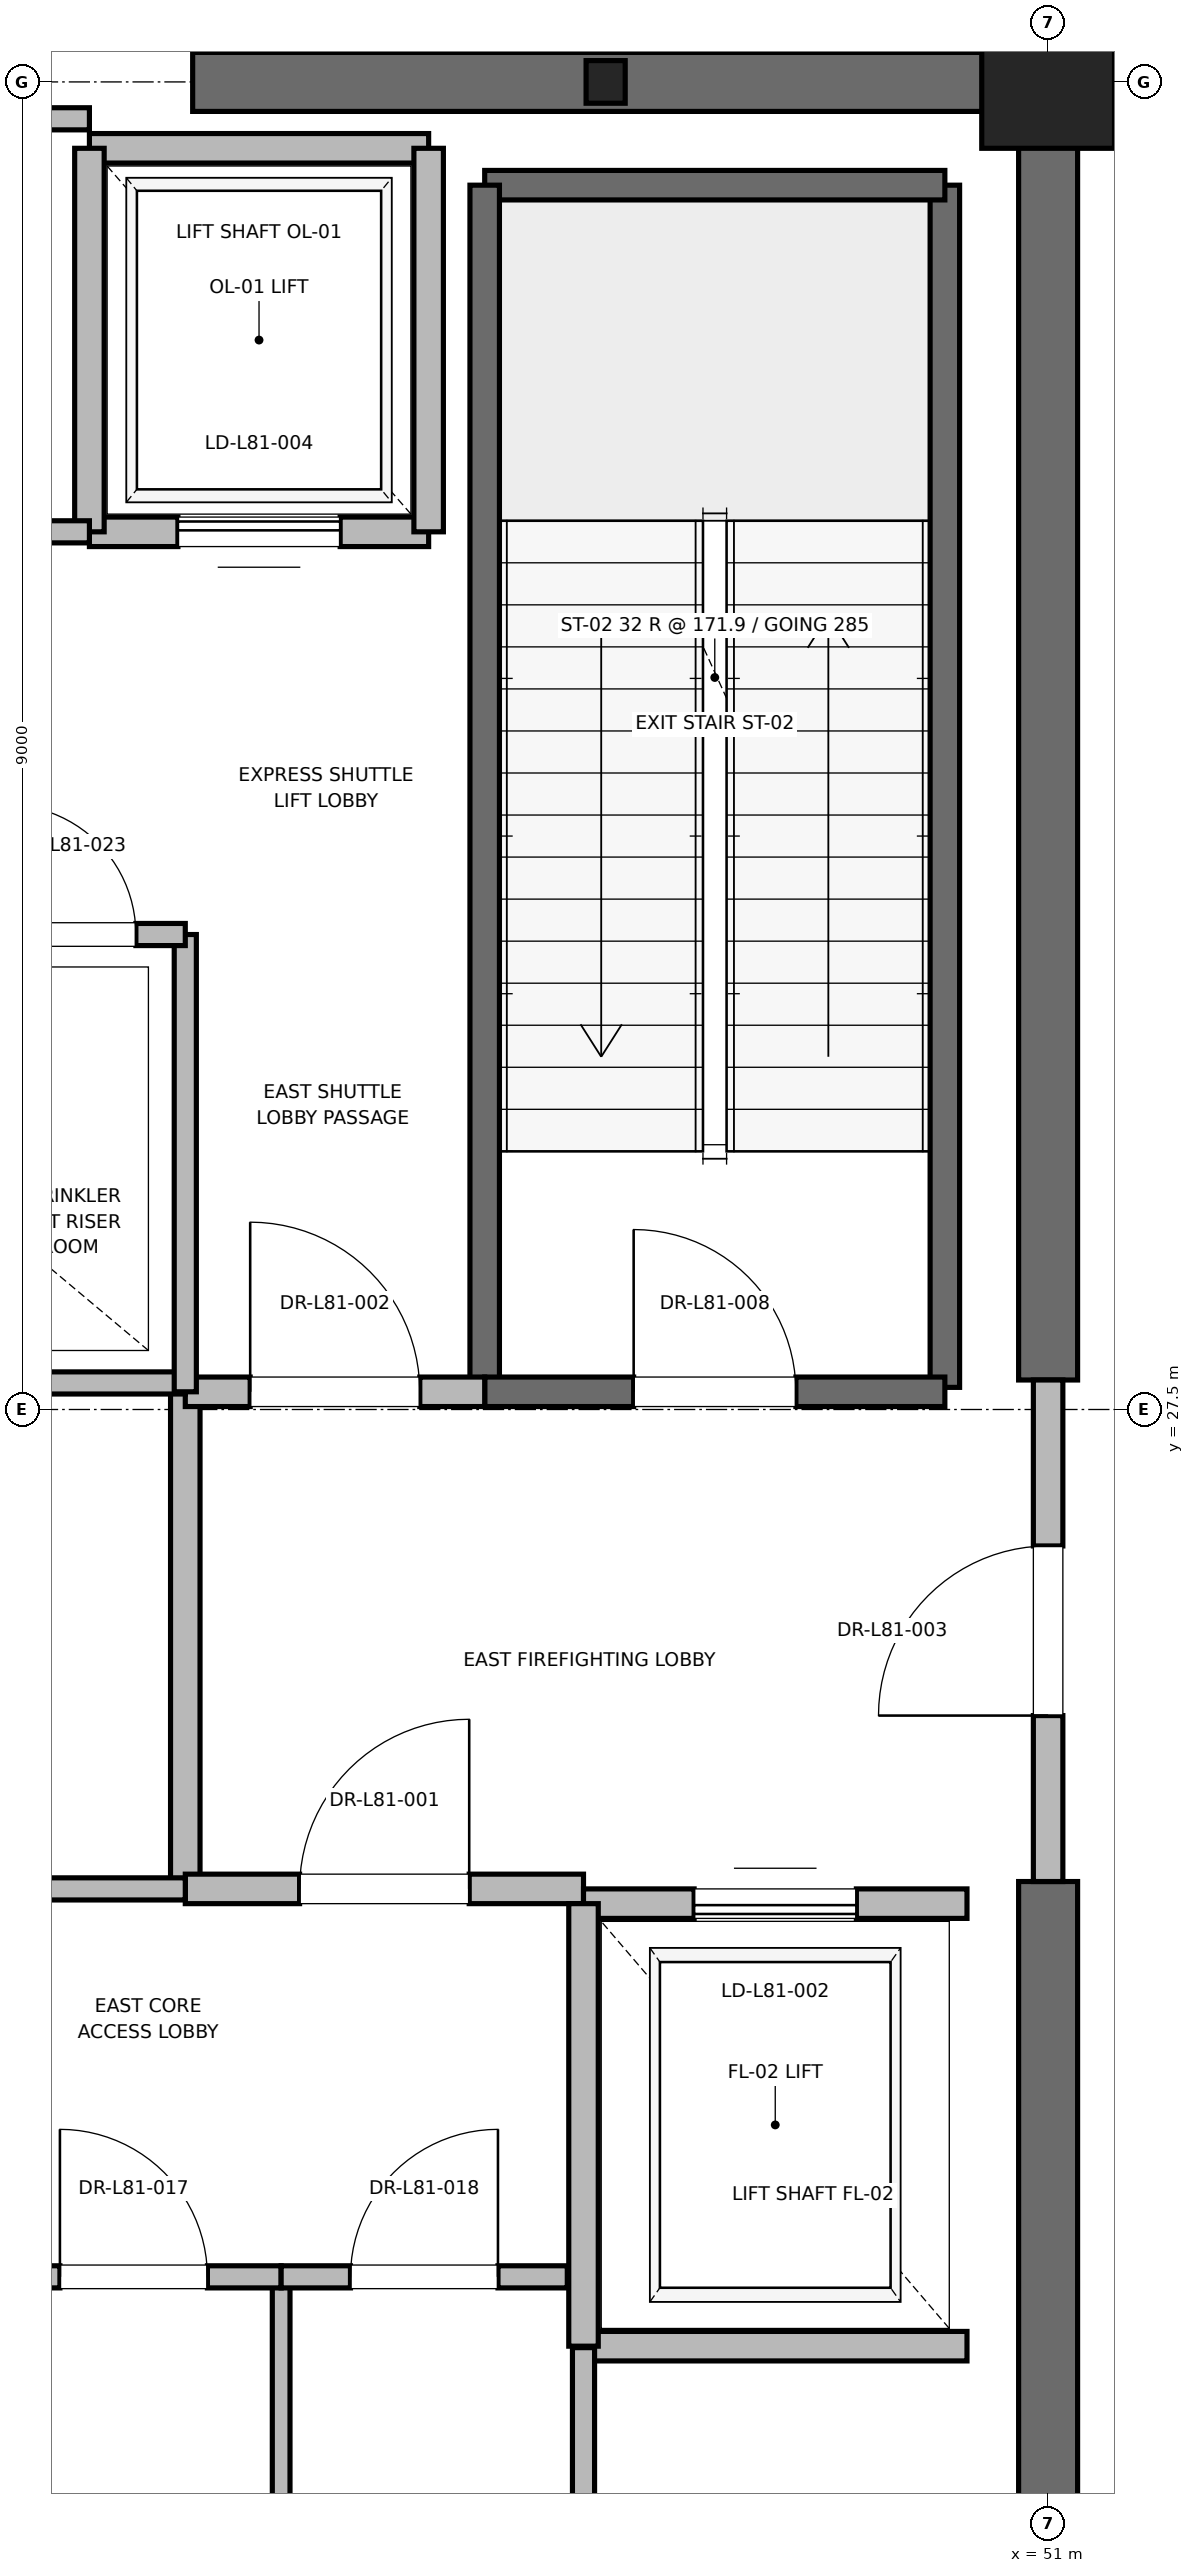
"""IFC4 building model, lengths in metres.
Left out: names, types, materials, properties, quantities, classifications, styles, units other than length and angle.
Written with IfcOpenShell. Run it as: python <this file> out.ifc"""

import sys

from ifc_helpers import new_model, si_unit, direction, frame, frame_2d, origin, origin_2d, place, context, subcontext, project, spatial, rectangle, i_section, extrude, element, fill, save


model = new_model("IFC4")
c1 = context("Model", 3, precision=1e-05, world=origin(), true_north=direction((0.0, 1.0)))
c2 = subcontext(c1, "Body", "Model", "MODEL_VIEW")
j1 = project(units=[si_unit("LENGTHUNIT", "METRE"), si_unit("PLANEANGLEUNIT", "RADIAN")], contexts=[c1])
p1 = place(None, origin())
s1 = spatial("IfcSite", under=j1, at=p1, CompositionType="ELEMENT")
p2 = place(p1, origin())
s2 = spatial("IfcBuilding", under=s1, at=p2, CompositionType="ELEMENT")
p3 = place(p2, frame((0.0, 0.0, 348.8)))
s3 = spatial("IfcBuildingStorey", under=s2, at=p3, CompositionType="ELEMENT", Elevation=348.8)
p4 = place(p3, frame((51.0, 36.5, 0.0), z_axis=(0.0, 0.0, 1.0), x_axis=(1.0, 0.0, 0.0)))
e1 = element("IfcColumn", 1, at=p4, inside=s3, PredefinedType="PILASTER", context=c2, shape_type="SweptSolid", body=[
    extrude(rectangle(XDim=0.9, YDim=0.9, at=origin_2d()), origin(), (0.0, 0.0, 1.0), 5.5),
])
p5 = place(p3, frame((48.0, 36.5, 0.0), z_axis=(0.0, 0.0, 1.0), x_axis=(1.0, 0.0, 0.0)))
e2 = element("IfcColumn", 2, at=p5, inside=s3, PredefinedType="COLUMN", context=c2, shape_type="SweptSolid", body=[
    extrude(i_section(OverallWidth=0.265, OverallDepth=0.289, WebThickness=0.019, FlangeThickness=0.032, FilletRadius=0.013, at=origin_2d()), origin(), (0.0, 0.0, 1.0), 5.5),
])
for number, where, z_axis, x_axis in (
    (3, (45.2, 36.5, 0.0), (0.0, 0.0, 1.0), (1.0, 0.0, 0.0)),
    (4, (51.0, 18.5, 0.0), (0.0, 0.0, 1.0), (0.0, 1.0, 0.0)),
):
    element("IfcWall", number, at=place(p3, frame(where, z_axis=z_axis, x_axis=x_axis)), inside=s3, PredefinedType="SHEAR", context=c2, shape_type="SweptSolid", body=[
        extrude(rectangle(XDim=5.8, YDim=0.4, at=frame_2d((2.9, 0.0))), origin(), (0.0, 0.0, 1.0), 5.2),
    ])
p6 = place(p3, frame((51.0, 27.7, 0.0), z_axis=(0.0, 0.0, 1.0), x_axis=(0.0, 1.0, 0.0)))
e5 = element("IfcWall", 5, at=p6, inside=s3, PredefinedType="SHEAR", context=c2, shape_type="SweptSolid", body=[
    extrude(rectangle(XDim=8.8, YDim=0.4, at=frame_2d((4.4, 0.0))), origin(), (0.0, 0.0, 1.0), 5.2),
])
p7 = place(p3, frame((50.3, 27.65, 0.0), z_axis=(0.0, 0.0, 1.0), x_axis=(0.0, 1.0, 0.0)))
e6 = element("IfcWall", 6, at=p7, inside=s3, PredefinedType="SOLIDWALL", context=c2, shape_type="SweptSolid", body=[
    extrude(rectangle(XDim=8.15, YDim=0.2, at=frame_2d((4.075, 0.0))), origin(), (0.0, 0.0, 1.0), 5.2),
])
p8 = place(p3, frame((47.18, 35.8, 0.0), z_axis=(0.0, 0.0, 1.0), x_axis=(1.0, 0.0, 0.0)))
e7 = element("IfcWall", 7, at=p8, inside=s3, PredefinedType="SOLIDWALL", context=c2, shape_type="SweptSolid", body=[
    extrude(rectangle(XDim=3.12, YDim=0.2, at=frame_2d((1.56, 0.0))), origin(), (0.0, 0.0, 1.0), 5.2),
])
p9 = place(p3, frame((47.18, 27.62, 0.0), z_axis=(0.0, 0.0, 1.0), x_axis=(0.0, 1.0, 0.0)))
e8 = element("IfcWall", 8, at=p9, inside=s3, PredefinedType="SOLIDWALL", context=c2, shape_type="SweptSolid", body=[
    extrude(rectangle(XDim=8.18, YDim=0.2, at=frame_2d((4.09, 0.0))), origin(), (0.0, 0.0, 1.0), 5.2),
])
p10 = place(p3, frame((47.18, 27.62, 0.0), z_axis=(0.0, 0.0, 1.0), x_axis=(1.0, 0.0, 0.0)))
e9 = element("IfcWall", 9, at=p10, inside=s3, PredefinedType="SOLIDWALL", context=c2, shape_type="SweptSolid", body=[
    extrude(rectangle(XDim=3.12, YDim=0.2, at=frame_2d((1.56, 0.0))), origin(), (0.0, 0.0, 1.0), 5.2),
])
p11 = place(p10, frame((1.01, 0.0, 0.0)))
e10 = element("IfcOpeningElement", 10, at=p11, cuts=e9, PredefinedType="OPENING", context=c2, shape_type="SweptSolid", body=[
    extrude(rectangle(XDim=1.1, YDim=2.15, at=frame_2d((0.55, 1.075))), frame((0.0, 0.1, 0.0), z_axis=(0.0, -1.0, 0.0), x_axis=(1.0, 0.0, 0.0)), (0.0, 0.0, 1.0), 0.2),
])
p12 = place(p3, frame((45.15, 24.25, 0.0), z_axis=(0.0, 0.0, 1.0), x_axis=(0.0, 1.0, 0.0)))
e11 = element("IfcWall", 11, at=p12, inside=s3, PredefinedType="PARTITIONING", context=c2, shape_type="SweptSolid", body=[
    extrude(rectangle(XDim=3.37, YDim=0.2, at=frame_2d((1.685, 0.0))), origin(), (0.0, 0.0, 1.0), 5.2),
])
p13 = place(p3, frame((45.15, 24.25, 0.0), z_axis=(0.0, 0.0, 1.0), x_axis=(1.0, 0.0, 0.0)))
e12 = element("IfcWall", 12, at=p13, inside=s3, PredefinedType="PARTITIONING", context=c2, shape_type="SweptSolid", body=[
    extrude(rectangle(XDim=2.7, YDim=0.2, at=frame_2d((1.35, 0.0))), origin(), (0.0, 0.0, 1.0), 5.2),
])
p14 = place(p13, frame((0.775, 0.0, 0.0)))
e13 = element("IfcOpeningElement", 13, at=p14, cuts=e12, PredefinedType="OPENING", context=c2, shape_type="SweptSolid", body=[
    extrude(rectangle(XDim=1.15, YDim=2.2, at=frame_2d((0.575, 1.1))), frame((0.0, 0.1, 0.0), z_axis=(0.0, -1.0, 0.0), x_axis=(1.0, 0.0, 0.0)), (0.0, 0.0, 1.0), 0.2),
])
p15 = place(p3, frame((45.15, 27.62, 0.0), z_axis=(0.0, 0.0, 1.0), x_axis=(1.0, 0.0, 0.0)))
e14 = element("IfcWall", 14, at=p15, inside=s3, PredefinedType="PARTITIONING", context=c2, shape_type="SweptSolid", body=[
    extrude(rectangle(XDim=2.03, YDim=0.2, at=frame_2d((1.015, 0.0))), origin(), (0.0, 0.0, 1.0), 5.2),
])
p16 = place(p15, frame((0.44, 0.0, 0.0)))
e15 = element("IfcOpeningElement", 15, at=p16, cuts=e14, PredefinedType="OPENING", context=c2, shape_type="SweptSolid", body=[
    extrude(rectangle(XDim=1.15, YDim=2.2, at=frame_2d((0.575, 1.1))), frame((0.0, 0.1, 0.0), z_axis=(0.0, -1.0, 0.0), x_axis=(1.0, 0.0, 0.0)), (0.0, 0.0, 1.0), 0.2),
])
p17 = place(p3, frame((51.0, 24.3, 0.0), z_axis=(0.0, 0.0, 1.0), x_axis=(0.0, 1.0, 0.0)))
e16 = element("IfcWall", 16, at=p17, inside=s3, PredefinedType="PARTITIONING", context=c2, shape_type="SweptSolid", body=[
    extrude(rectangle(XDim=3.4, YDim=0.2, at=frame_2d((1.7, 0.0))), origin(), (0.0, 0.0, 1.0), 4.28),
])
p18 = place(p17, frame((1.125, 0.0, 0.0)))
e17 = element("IfcOpeningElement", 17, at=p18, cuts=e16, PredefinedType="OPENING", context=c2, shape_type="SweptSolid", body=[
    extrude(rectangle(XDim=1.15, YDim=2.2, at=frame_2d((0.575, 1.1))), frame((0.0, 0.1, 0.0), z_axis=(0.0, -1.0, 0.0), x_axis=(1.0, 0.0, 0.0)), (0.0, 0.0, 1.0), 0.2),
])
p19 = place(p3, frame((47.85, 21.15, 0.0), z_axis=(0.0, 0.0, 1.0), x_axis=(1.0, 0.0, 0.0)))
e18 = element("IfcWall", 18, at=p19, inside=s3, PredefinedType="SOLIDWALL", context=c2, shape_type="SweptSolid", body=[
    extrude(rectangle(XDim=2.6, YDim=0.2, at=frame_2d((1.3, 0.0))), origin(), (0.0, 0.0, 1.0), 5.2),
])
p20 = place(p3, frame((50.45, 24.15, 0.0), z_axis=(0.0, 0.0, 1.0), x_axis=(-1.0, 0.0, 0.0)))
e19 = element("IfcWall", 19, at=p20, inside=s3, PredefinedType="SOLIDWALL", context=c2, shape_type="SweptSolid", body=[
    extrude(rectangle(XDim=2.6, YDim=0.2, at=frame_2d((1.3, 0.0))), origin(), (0.0, 0.0, 1.0), 4.28),
])
p21 = place(p20, frame((0.75, 0.0, 0.0)))
e20 = element("IfcOpeningElement", 20, at=p21, cuts=e19, PredefinedType="OPENING", context=c2, shape_type="SweptSolid", body=[
    extrude(rectangle(XDim=1.1, YDim=2.2, at=frame_2d((0.55, 1.1))), frame((0.0, 0.1, 0.0), z_axis=(0.0, -1.0, 0.0), x_axis=(1.0, 0.0, 0.0)), (0.0, 0.0, 1.0), 0.2),
])
p22 = place(p3, frame((47.85, 24.15, 0.0), z_axis=(0.0, 0.0, 1.0), x_axis=(0.0, -1.0, 0.0)))
e21 = element("IfcWall", 21, at=p22, inside=s3, PredefinedType="SOLIDWALL", context=c2, shape_type="SweptSolid", body=[
    extrude(rectangle(XDim=3.0, YDim=0.2, at=frame_2d((1.5, 0.0))), origin(), (0.0, 0.0, 1.0), 5.2),
])
p23 = place(p3, frame((44.5, 33.45, 0.0), z_axis=(0.0, 0.0, 1.0), x_axis=(1.0, 0.0, 0.0)))
e22 = element("IfcWall", 22, at=p23, inside=s3, PredefinedType="SOLIDWALL", context=c2, shape_type="SweptSolid", body=[
    extrude(rectangle(XDim=2.3, YDim=0.2, at=frame_2d((1.15, 0.0))), origin(), (0.0, 0.0, 1.0), 5.2),
])
p24 = place(p23, frame((0.6, 0.0, 0.0)))
e23 = element("IfcOpeningElement", 23, at=p24, cuts=e22, PredefinedType="OPENING", context=c2, shape_type="SweptSolid", body=[
    extrude(rectangle(XDim=1.1, YDim=2.2, at=frame_2d((0.55, 1.1))), frame((0.0, 0.1, 0.0), z_axis=(0.0, -1.0, 0.0), x_axis=(1.0, 0.0, 0.0)), (0.0, 0.0, 1.0), 0.2),
])
p25 = place(p3, frame((46.8, 36.05, 0.0), z_axis=(0.0, 0.0, 1.0), x_axis=(-1.0, 0.0, 0.0)))
e24 = element("IfcWall", 24, at=p25, inside=s3, PredefinedType="SOLIDWALL", context=c2, shape_type="SweptSolid", body=[
    extrude(rectangle(XDim=2.3, YDim=0.2, at=frame_2d((1.15, 0.0))), origin(), (0.0, 0.0, 1.0), 4.28),
])
p26 = place(p3, frame((44.5, 36.05, 0.0), z_axis=(0.0, 0.0, 1.0), x_axis=(0.0, -1.0, 0.0)))
e25 = element("IfcWall", 25, at=p26, inside=s3, PredefinedType="SOLIDWALL", context=c2, shape_type="SweptSolid", body=[
    extrude(rectangle(XDim=2.6, YDim=0.2, at=frame_2d((1.3, 0.0))), origin(), (0.0, 0.0, 1.0), 4.28),
])
p27 = place(p3, frame((46.8, 33.45, 0.0), z_axis=(0.0, 0.0, 1.0), x_axis=(0.0, 1.0, 0.0)))
e26 = element("IfcWall", 26, at=p27, inside=s3, PredefinedType="SOLIDWALL", context=c2, shape_type="SweptSolid", body=[
    extrude(rectangle(XDim=2.6, YDim=0.2, at=frame_2d((1.3, 0.0))), origin(), (0.0, 0.0, 1.0), 5.2),
])
p28 = place(p3, frame((41.56, 27.68, 0.0), z_axis=(0.0, 0.0, 1.0), x_axis=(1.0, 0.0, 0.0)))
e27 = element("IfcWall", 27, at=p28, inside=s3, PredefinedType="PARTITIONING", context=c2, shape_type="SweptSolid", body=[
    extrude(rectangle(XDim=3.59, YDim=0.15, at=frame_2d((1.795, 0.0))), origin(), (0.0, 0.0, 1.0), 2.85),
])
p29 = place(p3, frame((47.85, 18.6, 0.0), z_axis=(0.0, 0.0, 1.0), x_axis=(0.0, 1.0, 0.0)))
e28 = element("IfcWall", 28, at=p29, inside=s3, PredefinedType="PARTITIONING", context=c2, shape_type="SweptSolid", body=[
    extrude(rectangle(XDim=2.54, YDim=0.15, at=frame_2d((1.27, 0.0))), origin(), (0.0, 0.0, 1.0), 2.85),
])
p30 = place(p3, frame((45.8, 18.6, 0.0), z_axis=(0.0, 0.0, 1.0), x_axis=(0.0, 1.0, 0.0)))
e29 = element("IfcWall", 29, at=p30, inside=s3, PredefinedType="PARTITIONING", context=c2, shape_type="SweptSolid", body=[
    extrude(rectangle(XDim=3.02, YDim=0.12, at=frame_2d((1.51, 0.0))), origin(), (0.0, 0.0, 1.0), 2.85),
])
p31 = place(p3, frame((43.8, 21.62, 0.0), z_axis=(0.0, 0.0, 1.0), x_axis=(1.0, 0.0, 0.0)))
e30 = element("IfcWall", 30, at=p31, inside=s3, PredefinedType="PARTITIONING", context=c2, shape_type="SweptSolid", body=[
    extrude(rectangle(XDim=2.0, YDim=0.15, at=frame_2d((1.0, 0.0))), origin(), (0.0, 0.0, 1.0), 2.85),
])
p32 = place(p31, frame((0.5, 0.0, 0.0)))
e31 = element("IfcOpeningElement", 31, at=p32, cuts=e30, PredefinedType="OPENING", context=c2, shape_type="SweptSolid", body=[
    extrude(rectangle(XDim=1.0, YDim=2.15, at=frame_2d((0.5, 1.075))), frame((0.0, 0.075, 0.0), z_axis=(0.0, -1.0, 0.0), x_axis=(1.0, 0.0, 0.0)), (0.0, 0.0, 1.0), 0.15),
])
p33 = place(p3, frame((45.8, 21.62, 0.0), z_axis=(0.0, 0.0, 1.0), x_axis=(1.0, 0.0, 0.0)))
e32 = element("IfcWall", 32, at=p33, inside=s3, PredefinedType="PARTITIONING", context=c2, shape_type="SweptSolid", body=[
    extrude(rectangle(XDim=1.94, YDim=0.15, at=frame_2d((0.97, 0.0))), origin(), (0.0, 0.0, 1.0), 2.85),
])
p34 = place(p33, frame((0.47, 0.0, 0.0)))
e33 = element("IfcOpeningElement", 33, at=p34, cuts=e32, PredefinedType="OPENING", context=c2, shape_type="SweptSolid", body=[
    extrude(rectangle(XDim=1.0, YDim=2.15, at=frame_2d((0.5, 1.075))), frame((0.0, 0.075, 0.0), z_axis=(0.0, -1.0, 0.0), x_axis=(1.0, 0.0, 0.0)), (0.0, 0.0, 1.0), 0.15),
])
p35 = place(p3, frame((41.76, 24.25, 0.0), z_axis=(0.0, 0.0, 1.0), x_axis=(1.0, 0.0, 0.0)))
e34 = element("IfcWall", 34, at=p35, inside=s3, PredefinedType="PARTITIONING", context=c2, shape_type="SweptSolid", body=[
    extrude(rectangle(XDim=3.39, YDim=0.15, at=frame_2d((1.695, 0.0))), origin(), (0.0, 0.0, 1.0), 2.85),
])
p36 = place(p35, frame((1.255, 0.0, 0.0)))
e35 = element("IfcOpeningElement", 35, at=p36, cuts=e34, PredefinedType="OPENING", context=c2, shape_type="SweptSolid", body=[
    extrude(rectangle(XDim=0.88, YDim=2.1, at=frame_2d((0.44, 1.05))), frame((0.0, 0.075, 0.0), z_axis=(0.0, -1.0, 0.0), x_axis=(1.0, 0.0, 0.0)), (0.0, 0.0, 1.0), 0.15),
])
p37 = place(p3, frame((45.15, 27.62, 0.0), z_axis=(0.0, 0.0, 1.0), x_axis=(0.0, 1.0, 0.0)))
e36 = element("IfcWall", 36, at=p37, inside=s3, PredefinedType="PARTITIONING", context=c2, shape_type="SweptSolid", body=[
    extrude(rectangle(XDim=3.1, YDim=0.15, at=frame_2d((1.55, 0.0))), origin(), (0.0, 0.0, 1.0), 2.85),
])
p38 = place(p3, frame((43.6, 30.72, 0.0), z_axis=(0.0, 0.0, 1.0), x_axis=(1.0, 0.0, 0.0)))
e37 = element("IfcWall", 37, at=p38, inside=s3, PredefinedType="PARTITIONING", context=c2, shape_type="SweptSolid", body=[
    extrude(rectangle(XDim=1.55, YDim=0.15, at=frame_2d((0.775, 0.0))), origin(), (0.0, 0.0, 1.0), 2.85),
])
p39 = place(p38, frame((0.335, 0.0, 0.0)))
e38 = element("IfcOpeningElement", 38, at=p39, cuts=e37, PredefinedType="OPENING", context=c2, shape_type="SweptSolid", body=[
    extrude(rectangle(XDim=0.88, YDim=2.1, at=frame_2d((0.44, 1.05))), frame((0.0, 0.075, 0.0), z_axis=(0.0, -1.0, 0.0), x_axis=(1.0, 0.0, 0.0)), (0.0, 0.0, 1.0), 0.15),
])
p40 = place(p3, frame((41.56, 36.25, 0.0), z_axis=(0.0, 0.0, 1.0), x_axis=(1.0, 0.0, 0.0)))
e39 = element("IfcWall", 39, at=p40, inside=s3, PredefinedType="PARTITIONING", context=c2, shape_type="SweptSolid", body=[
    extrude(rectangle(XDim=2.94, YDim=0.15, at=frame_2d((1.47, 0.0))), origin(), (0.0, 0.0, 1.0), 2.85),
])
p41 = place(p3, frame((41.56, 33.45, 0.0), z_axis=(0.0, 0.0, 1.0), x_axis=(1.0, 0.0, 0.0)))
e40 = element("IfcWall", 40, at=p41, inside=s3, PredefinedType="PARTITIONING", context=c2, shape_type="SweptSolid", body=[
    extrude(rectangle(XDim=2.94, YDim=0.15, at=frame_2d((1.47, 0.0))), origin(), (0.0, 0.0, 1.0), 2.85),
])
p42 = place(p41, frame((1.03, 0.0, 0.0)))
e41 = element("IfcOpeningElement", 41, at=p42, cuts=e40, PredefinedType="OPENING", context=c2, shape_type="SweptSolid", body=[
    extrude(rectangle(XDim=0.88, YDim=2.1, at=frame_2d((0.44, 1.05))), frame((0.0, 0.075, 0.0), z_axis=(0.0, -1.0, 0.0), x_axis=(1.0, 0.0, 0.0)), (0.0, 0.0, 1.0), 0.15),
])
p43 = place(p11, origin())
e42 = element("IfcDoor", 42, at=p43, inside=s3, OperationType="SINGLE_SWING_LEFT", PredefinedType="DOOR", context=c2, shape_type="SweptSolid", body=[
    extrude(rectangle(XDim=1.1, YDim=2.15, at=frame_2d((0.55, 1.075))), frame((0.0, 0.025, 0.0), z_axis=(0.0, -1.0, 0.0), x_axis=(1.0, 0.0, 0.0)), (0.0, 0.0, 1.0), 0.05),
])
fill(e10, e42)
p44 = place(p14, origin())
e43 = element("IfcDoor", 43, at=p44, inside=s3, OperationType="SINGLE_SWING_RIGHT", PredefinedType="DOOR", context=c2, shape_type="SweptSolid", body=[
    extrude(rectangle(XDim=1.15, YDim=2.2, at=frame_2d((0.575, 1.1))), frame((0.0, 0.025, 0.0), z_axis=(0.0, -1.0, 0.0), x_axis=(1.0, 0.0, 0.0)), (0.0, 0.0, 1.0), 0.05),
])
fill(e13, e43)
p45 = place(p16, origin())
e44 = element("IfcDoor", 44, at=p45, inside=s3, OperationType="SINGLE_SWING_LEFT", PredefinedType="DOOR", context=c2, shape_type="SweptSolid", body=[
    extrude(rectangle(XDim=1.15, YDim=2.2, at=frame_2d((0.575, 1.1))), frame((0.0, 0.025, 0.0), z_axis=(0.0, -1.0, 0.0), x_axis=(1.0, 0.0, 0.0)), (0.0, 0.0, 1.0), 0.05),
])
fill(e15, e44)
p46 = place(p18, origin())
e45 = element("IfcDoor", 45, at=p46, inside=s3, OperationType="SINGLE_SWING_LEFT", PredefinedType="DOOR", context=c2, shape_type="SweptSolid", body=[
    extrude(rectangle(XDim=1.15, YDim=2.2, at=frame_2d((0.575, 1.1))), frame((0.0, 0.025, 0.0), z_axis=(0.0, -1.0, 0.0), x_axis=(1.0, 0.0, 0.0)), (0.0, 0.0, 1.0), 0.05),
])
fill(e17, e45)
p47 = place(p21, origin())
e46 = element("IfcDoor", 46, at=p47, inside=s3, OperationType="SLIDING_TO_RIGHT", PredefinedType="DOOR", context=c2, shape_type="SweptSolid", body=[
    extrude(rectangle(XDim=1.1, YDim=2.2, at=frame_2d((0.55, 1.1))), frame((0.0, 0.025, 0.0), z_axis=(0.0, -1.0, 0.0), x_axis=(1.0, 0.0, 0.0)), (0.0, 0.0, 1.0), 0.05),
])
fill(e20, e46)
p48 = place(p24, origin())
e47 = element("IfcDoor", 47, at=p48, inside=s3, OperationType="SLIDING_TO_RIGHT", PredefinedType="DOOR", context=c2, shape_type="SweptSolid", body=[
    extrude(rectangle(XDim=1.1, YDim=2.2, at=frame_2d((0.55, 1.1))), frame((0.0, 0.025, 0.0), z_axis=(0.0, -1.0, 0.0), x_axis=(1.0, 0.0, 0.0)), (0.0, 0.0, 1.0), 0.05),
])
fill(e23, e47)
p49 = place(p32, origin())
e48 = element("IfcDoor", 48, at=p49, inside=s3, OperationType="SINGLE_SWING_LEFT", PredefinedType="DOOR", context=c2, shape_type="SweptSolid", body=[
    extrude(rectangle(XDim=1.0, YDim=2.15, at=frame_2d((0.5, 1.075))), frame((0.0, 0.025, 0.0), z_axis=(0.0, -1.0, 0.0), x_axis=(1.0, 0.0, 0.0)), (0.0, 0.0, 1.0), 0.05),
])
fill(e31, e48)
p50 = place(p34, origin())
e49 = element("IfcDoor", 49, at=p50, inside=s3, OperationType="SINGLE_SWING_RIGHT", PredefinedType="DOOR", context=c2, shape_type="SweptSolid", body=[
    extrude(rectangle(XDim=1.0, YDim=2.15, at=frame_2d((0.5, 1.075))), frame((0.0, 0.025, 0.0), z_axis=(0.0, -1.0, 0.0), x_axis=(1.0, 0.0, 0.0)), (0.0, 0.0, 1.0), 0.05),
])
fill(e33, e49)
p51 = place(p39, origin())
e50 = element("IfcDoor", 50, at=p51, inside=s3, OperationType="SINGLE_SWING_LEFT", PredefinedType="DOOR", context=c2, shape_type="SweptSolid", body=[
    extrude(rectangle(XDim=0.88, YDim=2.1, at=frame_2d((0.44, 1.05))), frame((0.0, 0.025, 0.0), z_axis=(0.0, -1.0, 0.0), x_axis=(1.0, 0.0, 0.0)), (0.0, 0.0, 1.0), 0.05),
])
fill(e38, e50)
save(model, sys.argv[1])
